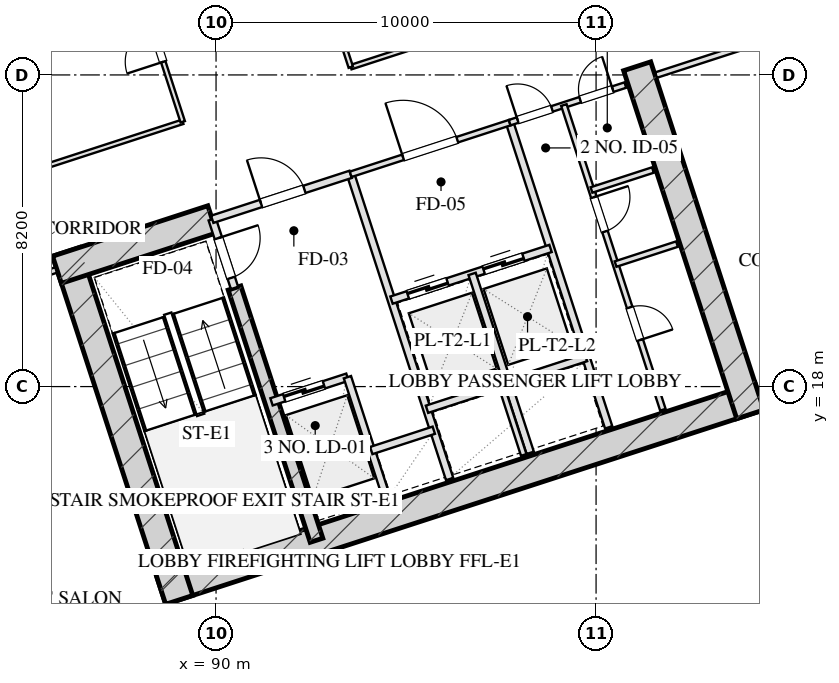
"""IFC4 building model, lengths in metres.
Left out: names, types, materials, properties, quantities, classifications, styles, units other than length and angle.
Written with IfcOpenShell. Run it as: python <this file> out.ifc"""

import sys

from ifc_helpers import new_model, si_unit, direction, frame, frame_2d, origin, place, context, subcontext, project, spatial, rectangle, extrude, element, fill, save


model = new_model("IFC4")
c1 = context("Model", 3, precision=1e-05, world=origin(), true_north=direction((0.0, 1.0)))
c2 = subcontext(c1, "Body", "Model", "MODEL_VIEW")
j1 = project(units=[si_unit("LENGTHUNIT", "METRE"), si_unit("PLANEANGLEUNIT", "RADIAN")], contexts=[c1])
p1 = place(None, origin())
s1 = spatial("IfcSite", under=j1, at=p1, CompositionType="ELEMENT")
p2 = place(p1, origin())
s2 = spatial("IfcBuilding", under=s1, at=p2, CompositionType="ELEMENT")
p3 = place(p2, frame((0.0, 0.0, 57.5)))
s3 = spatial("IfcBuildingStorey", under=s2, at=p3, CompositionType="ELEMENT", Elevation=57.5)
p4 = place(p3, frame((88.559, 12.629, 0.0), z_axis=(0.0, 0.0, 1.0), x_axis=(0.951056072937, 0.309018358888, 0.0)))
e1 = element("IfcWall", 1, at=p4, inside=s3, PredefinedType="SHEAR", context=c2, shape_type="SweptSolid", body=[
    extrude(rectangle(XDim=16.55, YDim=0.75, at=frame_2d((8.275, 0.0))), origin(), (0.0, 0.0, 1.0), 3.45),
])
p5 = place(p3, frame((86.055, 21.546, 0.0), z_axis=(0.0, 0.0, 1.0), x_axis=(0.309023585745, -0.951054374604, 0.0)))
e2 = element("IfcWall", 2, at=p5, inside=s3, PredefinedType="SHEAR", context=c2, shape_type="SweptSolid", body=[
    extrude(rectangle(XDim=9.63, YDim=0.75, at=frame_2d((4.815, 0.0))), origin(), (0.0, 0.0, 1.0), 3.45),
])
p6 = place(p3, frame((101.082, 26.429, 0.0), z_axis=(0.0, 0.0, 1.0), x_axis=(0.309016134813, -0.951056795583, 0.0)))
e3 = element("IfcWall", 3, at=p6, inside=s3, PredefinedType="SHEAR", context=c2, shape_type="SweptSolid", body=[
    extrude(rectangle(XDim=9.63, YDim=0.75, at=frame_2d((4.815, 0.0))), origin(), (0.0, 0.0, 1.0), 3.45),
])
p7 = place(p3, frame((90.486, 20.594, 0.0), z_axis=(0.0, 0.0, 1.0), x_axis=(0.309020428229, -0.951055400562, 0.0)))
e4 = element("IfcWall", 4, at=p7, inside=s3, PredefinedType="SHEAR", context=c2, shape_type="SweptSolid", body=[
    extrude(rectangle(XDim=6.98, YDim=0.35, at=frame_2d((3.49, 0.0))), origin(), (0.0, 0.0, 1.0), 3.45),
])
p8 = place(p3, frame((85.814, 21.074, 0.0), z_axis=(0.0, 0.0, 1.0), x_axis=(0.95106580992, 0.308988390074, 0.0)))
e5 = element("IfcWall", 5, at=p8, inside=s3, PredefinedType="SHEAR", context=c2, shape_type="SweptSolid", body=[
    extrude(rectangle(XDim=4.295, YDim=0.75, at=frame_2d((2.147, 0.0))), origin(), (0.0, 0.0, 1.0), 3.45),
])
p9 = place(p3, frame((100.345, 63.648, 0.0), z_axis=(0.0, 0.0, 1.0), x_axis=(0.309014526607, -0.951057318118, 0.0)))
e6 = element("IfcWall", 6, at=p9, inside=s3, PredefinedType="SOLIDWALL", context=c2, shape_type="SweptSolid", body=[
    extrude(rectangle(XDim=50.0, YDim=0.4, at=frame_2d((25.0, 0.0))), origin(), (0.0, 0.0, 1.0), 2.61),
])
p10 = place(p9, frame((21.85, 0.0, 0.0)))
e7 = element("IfcOpeningElement", 7, at=p10, cuts=e6, PredefinedType="OPENING", context=c2, shape_type="SweptSolid", body=[
    extrude(rectangle(XDim=1.1, YDim=2.15, at=frame_2d((0.55, 1.075))), frame((0.0, 0.21, 0.0), z_axis=(0.0, -1.0, 0.0), x_axis=(1.0, 0.0, 0.0)), (0.0, 0.0, 1.0), 0.42),
])
p11 = place(p3, frame((113.998, 12.567, 0.0), z_axis=(0.0, 0.0, 1.0), x_axis=(-0.951055939317, -0.309018770125, 0.0)))
e8 = element("IfcWall", 8, at=p11, inside=s3, PredefinedType="SOLIDWALL", context=c2, shape_type="SweptSolid", body=[
    extrude(rectangle(XDim=32.4, YDim=0.4, at=frame_2d((16.2, 0.0))), origin(), (0.0, 0.0, 1.0), 2.61),
])
p12 = place(p3, frame((89.899, 22.401, 0.0), z_axis=(0.0, 0.0, 1.0), x_axis=(0.308932062672, -0.951084108086, 0.0)))
e9 = element("IfcWall", 9, at=p12, inside=s3, PredefinedType="PARTITIONING", context=c2, shape_type="SweptSolid", body=[
    extrude(rectangle(XDim=1.9, YDim=0.2, at=frame_2d((0.95, 0.0))), origin(), (0.0, 0.0, 1.0), 3.175),
])
p13 = place(p12, frame((0.52, 0.0, 0.0)))
e10 = element("IfcOpeningElement", 10, at=p13, cuts=e9, PredefinedType="OPENING", context=c2, shape_type="SweptSolid", body=[
    extrude(rectangle(XDim=1.1, YDim=2.05, at=frame_2d((0.55, 1.025))), frame((0.0, 0.11, 0.0), z_axis=(0.0, -1.0, 0.0), x_axis=(1.0, 0.0, 0.0)), (0.0, 0.0, 1.0), 0.22),
])
p14 = place(p3, frame((93.542, 23.585, 0.0), z_axis=(0.0, 0.0, 1.0), x_axis=(0.309042196757, -0.951048327176, 0.0)))
e11 = element("IfcWall", 11, at=p14, inside=s3, PredefinedType="PARTITIONING", context=c2, shape_type="SweptSolid", body=[
    extrude(rectangle(XDim=8.43, YDim=0.2, at=frame_2d((4.215, 0.0))), origin(), (0.0, 0.0, 1.0), 3.175),
])
p15 = place(p3, frame((89.899, 22.401, 0.0), z_axis=(0.0, 0.0, 1.0), x_axis=(0.951046716504, 0.309047153403, 0.0)))
e12 = element("IfcWall", 12, at=p15, inside=s3, PredefinedType="PARTITIONING", context=c2, shape_type="SweptSolid", body=[
    extrude(rectangle(XDim=3.83, YDim=0.2, at=frame_2d((1.915, 0.0))), origin(), (0.0, 0.0, 1.0), 3.175),
])
p16 = place(p15, frame((1.35, 0.0, 0.0)))
e13 = element("IfcOpeningElement", 13, at=p16, cuts=e12, PredefinedType="OPENING", context=c2, shape_type="SweptSolid", body=[
    extrude(rectangle(XDim=1.2, YDim=2.05, at=frame_2d((0.6, 1.025))), frame((0.0, 0.11, 0.0), z_axis=(0.0, -1.0, 0.0), x_axis=(1.0, 0.0, 0.0)), (0.0, 0.0, 1.0), 0.22),
])
p17 = place(p3, frame((91.46, 17.598, 0.0), z_axis=(0.0, 0.0, 1.0), x_axis=(0.951062257173, 0.308999325213, 0.0)))
e14 = element("IfcWall", 14, at=p17, inside=s3, PredefinedType="PARTITIONING", context=c2, shape_type="SweptSolid", body=[
    extrude(rectangle(XDim=2.1, YDim=0.2, at=frame_2d((1.05, 0.0))), origin(), (0.0, 0.0, 1.0), 3.175),
])
p18 = place(p17, frame((0.35, 0.0, 0.0)))
e15 = element("IfcOpeningElement", 15, at=p18, cuts=e14, PredefinedType="OPENING", context=c2, shape_type="SweptSolid", body=[
    extrude(rectangle(XDim=1.1, YDim=2.05, at=frame_2d((0.55, 1.025))), frame((0.0, 0.11, 0.0), z_axis=(0.0, -1.0, 0.0), x_axis=(1.0, 0.0, 0.0)), (0.0, 0.0, 1.0), 0.22),
])
p19 = place(p3, frame((93.457, 18.247, 0.0), z_axis=(0.0, 0.0, 1.0), x_axis=(0.3089935693, -0.951064127245, 0.0)))
e16 = element("IfcWall", 16, at=p19, inside=s3, PredefinedType="PARTITIONING", context=c2, shape_type="SweptSolid", body=[
    extrude(rectangle(XDim=3.7, YDim=0.2, at=frame_2d((1.85, 0.0))), origin(), (0.0, 0.0, 1.0), 3.175),
])
p20 = place(p3, frame((94.084, 16.317, 0.0), z_axis=(0.0, 0.0, 1.0), x_axis=(0.951041328149, 0.309063734775, 0.0)))
e17 = element("IfcWall", 17, at=p20, inside=s3, PredefinedType="PARTITIONING", context=c2, shape_type="SweptSolid", body=[
    extrude(rectangle(XDim=1.73, YDim=0.2, at=frame_2d((0.865, 0.0))), origin(), (0.0, 0.0, 1.0), 3.175),
])
p21 = place(p3, frame((97.727, 24.944, 0.0), z_axis=(0.0, 0.0, 1.0), x_axis=(0.309016001439, -0.951056838919, 0.0)))
e18 = element("IfcWall", 18, at=p21, inside=s3, PredefinedType="PARTITIONING", context=c2, shape_type="SweptSolid", body=[
    extrude(rectangle(XDim=8.43, YDim=0.2, at=frame_2d((4.215, 0.0))), origin(), (0.0, 0.0, 1.0), 3.175),
])
p22 = place(p3, frame((93.542, 23.585, 0.0), z_axis=(0.0, 0.0, 1.0), x_axis=(0.951063829732, 0.308994485023, 0.0)))
e19 = element("IfcWall", 19, at=p22, inside=s3, PredefinedType="PARTITIONING", context=c2, shape_type="SweptSolid", body=[
    extrude(rectangle(XDim=4.4, YDim=0.15, at=frame_2d((2.2, 0.0))), origin(), (0.0, 0.0, 1.0), 3.175),
])
p23 = place(p22, frame((1.45, 0.0, 0.0)))
e20 = element("IfcOpeningElement", 20, at=p23, cuts=e19, PredefinedType="OPENING", context=c2, shape_type="SweptSolid", body=[
    extrude(rectangle(XDim=1.5, YDim=2.05, at=frame_2d((0.75, 1.025))), frame((0.0, 0.085, 0.0), z_axis=(0.0, -1.0, 0.0), x_axis=(1.0, 0.0, 0.0)), (0.0, 0.0, 1.0), 0.17),
])
p24 = place(p3, frame((94.617, 20.275, 0.0), z_axis=(0.0, 0.0, 1.0), x_axis=(0.951058531764, 0.30901079133, 0.0)))
e21 = element("IfcWall", 21, at=p24, inside=s3, PredefinedType="PARTITIONING", context=c2, shape_type="SweptSolid", body=[
    extrude(rectangle(XDim=4.4, YDim=0.2, at=frame_2d((2.2, 0.0))), origin(), (0.0, 0.0, 1.0), 3.175),
])
p25 = place(p24, frame((0.45, 0.0, 0.0)))
e22 = element("IfcOpeningElement", 22, at=p25, cuts=e21, PredefinedType="OPENING", context=c2, shape_type="SweptSolid", body=[
    extrude(rectangle(XDim=1.1, YDim=2.05, at=frame_2d((0.55, 1.025))), frame((0.0, 0.11, 0.0), z_axis=(0.0, -1.0, 0.0), x_axis=(1.0, 0.0, 0.0)), (0.0, 0.0, 1.0), 0.22),
])
p26 = place(p24, frame((2.55, 0.0, 0.0)))
e23 = element("IfcOpeningElement", 23, at=p26, cuts=e21, PredefinedType="OPENING", context=c2, shape_type="SweptSolid", body=[
    extrude(rectangle(XDim=1.1, YDim=2.05, at=frame_2d((0.55, 1.025))), frame((0.0, 0.11, 0.0), z_axis=(0.0, -1.0, 0.0), x_axis=(1.0, 0.0, 0.0)), (0.0, 0.0, 1.0), 0.22),
])
p27 = place(p3, frame((96.738, 20.964, 0.0), z_axis=(0.0, 0.0, 1.0), x_axis=(0.309042578481, -0.951048203135, 0.0)))
e24 = element("IfcWall", 24, at=p27, inside=s3, PredefinedType="PARTITIONING", context=c2, shape_type="SweptSolid", body=[
    extrude(rectangle(XDim=4.95, YDim=0.2, at=frame_2d((2.475, 0.0))), origin(), (0.0, 0.0, 1.0), 3.175),
])
p28 = place(p3, frame((95.551, 17.403, 0.0), z_axis=(0.0, 0.0, 1.0), x_axis=(0.951058531764, 0.30901079133, 0.0)))
e25 = element("IfcWall", 25, at=p28, inside=s3, PredefinedType="PARTITIONING", context=c2, shape_type="SweptSolid", body=[
    extrude(rectangle(XDim=4.4, YDim=0.2, at=frame_2d((2.2, 0.0))), origin(), (0.0, 0.0, 1.0), 3.175),
])
p29 = place(p3, frame((97.516, 17.989, 0.0), z_axis=(0.0, 0.0, 1.0), x_axis=(0.30897153969, -0.951071284217, 0.0)))
e26 = element("IfcWall", 26, at=p29, inside=s3, PredefinedType="PARTITIONING", context=c2, shape_type="SweptSolid", body=[
    extrude(rectangle(XDim=1.88, YDim=0.15, at=frame_2d((0.94, 0.0))), origin(), (0.0, 0.0, 1.0), 3.175),
])
p30 = place(p3, frame((97.727, 24.944, 0.0), z_axis=(0.0, 0.0, 1.0), x_axis=(0.951036872128, 0.309077446369, 0.0)))
e27 = element("IfcWall", 27, at=p30, inside=s3, PredefinedType="PARTITIONING", context=c2, shape_type="SweptSolid", body=[
    extrude(rectangle(XDim=3.2, YDim=0.15, at=frame_2d((1.6, 0.0))), origin(), (0.0, 0.0, 1.0), 3.175),
])
p31 = place(p30, frame((0.22, 0.0, 0.0)))
e28 = element("IfcOpeningElement", 28, at=p31, cuts=e27, PredefinedType="OPENING", context=c2, shape_type="SweptSolid", body=[
    extrude(rectangle(XDim=0.95, YDim=2.05, at=frame_2d((0.475, 1.025))), frame((0.0, 0.085, 0.0), z_axis=(0.0, -1.0, 0.0), x_axis=(1.0, 0.0, 0.0)), (0.0, 0.0, 1.0), 0.17),
])
p32 = place(p30, frame((1.95, 0.0, 0.0)))
e29 = element("IfcOpeningElement", 29, at=p32, cuts=e27, PredefinedType="OPENING", context=c2, shape_type="SweptSolid", body=[
    extrude(rectangle(XDim=0.9, YDim=2.05, at=frame_2d((0.45, 1.025))), frame((0.0, 0.085, 0.0), z_axis=(0.0, -1.0, 0.0), x_axis=(1.0, 0.0, 0.0)), (0.0, 0.0, 1.0), 0.17),
])
p33 = place(p3, frame((99.153, 25.408, 0.0), z_axis=(0.0, 0.0, 1.0), x_axis=(0.309016001439, -0.951056838919, 0.0)))
e30 = element("IfcWall", 30, at=p33, inside=s3, PredefinedType="PARTITIONING", context=c2, shape_type="SweptSolid", body=[
    extrude(rectangle(XDim=8.43, YDim=0.15, at=frame_2d((4.215, 0.0))), origin(), (0.0, 0.0, 1.0), 3.175),
])
p34 = place(p33, frame((2.55, 0.0, 0.0)))
e31 = element("IfcOpeningElement", 31, at=p34, cuts=e30, PredefinedType="OPENING", context=c2, shape_type="SweptSolid", body=[
    extrude(rectangle(XDim=0.95, YDim=2.05, at=frame_2d((0.475, 1.025))), frame((0.0, 0.085, 0.0), z_axis=(0.0, -1.0, 0.0), x_axis=(1.0, 0.0, 0.0)), (0.0, 0.0, 1.0), 0.17),
])
p35 = place(p33, frame((5.6, 0.0, 0.0)))
e32 = element("IfcOpeningElement", 32, at=p35, cuts=e30, PredefinedType="OPENING", context=c2, shape_type="SweptSolid", body=[
    extrude(rectangle(XDim=0.9, YDim=2.05, at=frame_2d((0.45, 1.025))), frame((0.0, 0.085, 0.0), z_axis=(0.0, -1.0, 0.0), x_axis=(1.0, 0.0, 0.0)), (0.0, 0.0, 1.0), 0.17),
])
for number, where, z_axis, x_axis in (
    (33, (100.513, 21.223, 0.0), (0.0, 0.0, 1.0), (0.951, 0.309, 0.0)),
    (34, (99.879, 23.173, 0.0), (0.0, 0.0, 1.0), (0.951, 0.309, 0.0)),
):
    element("IfcWall", number, at=place(p3, frame(where, z_axis=z_axis, x_axis=x_axis)), inside=s3, PredefinedType="PARTITIONING", context=c2, shape_type="SweptSolid", body=[
        extrude(rectangle(XDim=1.7, YDim=0.15, at=frame_2d((0.85, 0.0))), origin(), (0.0, 0.0, 1.0), 3.175),
    ])
p36 = place(p3, frame((75.519, 17.729, 0.0), z_axis=(0.0, 0.0, 1.0), x_axis=(0.951056658866, 0.309016555588, 0.0)))
e35 = element("IfcWall", 35, at=p36, inside=s3, PredefinedType="PARTITIONING", context=c2, shape_type="SweptSolid", body=[
    extrude(rectangle(XDim=10.8, YDim=0.15, at=frame_2d((5.4, 0.0))), origin(), (0.0, 0.0, 1.0), 3.175),
])
p37 = place(p36, frame((4.536, 0.0, 0.0)))
e36 = element("IfcOpeningElement", 36, at=p37, cuts=e35, PredefinedType="OPENING", context=c2, shape_type="SweptSolid", body=[
    extrude(rectangle(XDim=1.0, YDim=2.05, at=frame_2d((0.5, 1.025))), frame((0.0, 0.085, 0.0), z_axis=(0.0, -1.0, 0.0), x_axis=(1.0, 0.0, 0.0)), (0.0, 0.0, 1.0), 0.17),
])
p38 = place(p3, frame((101.578, 26.196, 0.0), z_axis=(0.0, 0.0, 1.0), x_axis=(0.951059043131, 0.309009217467, 0.0)))
e37 = element("IfcWall", 37, at=p38, inside=s3, PredefinedType="PARTITIONING", context=c2, shape_type="SweptSolid", body=[
    extrude(rectangle(XDim=10.2, YDim=0.15, at=frame_2d((5.1, 0.0))), origin(), (0.0, 0.0, 1.0), 3.175),
])
p39 = place(p38, frame((4.284, 0.0, 0.0)))
e38 = element("IfcOpeningElement", 38, at=p39, cuts=e37, PredefinedType="OPENING", context=c2, shape_type="SweptSolid", body=[
    extrude(rectangle(XDim=1.0, YDim=2.05, at=frame_2d((0.5, 1.025))), frame((0.0, 0.085, 0.0), z_axis=(0.0, -1.0, 0.0), x_axis=(1.0, 0.0, 0.0)), (0.0, 0.0, 1.0), 0.17),
])
p40 = place(p3, frame((74.691, 20.278, 0.0), z_axis=(0.0, 0.0, 1.0), x_axis=(0.951054756643, 0.309022409974, 0.0)))
e39 = element("IfcWall", 39, at=p40, inside=s3, PredefinedType="PARTITIONING", context=c2, shape_type="SweptSolid", body=[
    extrude(rectangle(XDim=15.175, YDim=0.12, at=frame_2d((7.587, 0.0))), origin(), (0.0, 0.0, 1.0), 3.175),
])
p41 = place(p3, frame((93.546, 26.404, 0.0), z_axis=(0.0, 0.0, 1.0), x_axis=(0.951058189574, 0.309011844505, 0.0)))
e40 = element("IfcWall", 40, at=p41, inside=s3, PredefinedType="PARTITIONING", context=c2, shape_type="SweptSolid", body=[
    extrude(rectangle(XDim=17.775, YDim=0.12, at=frame_2d((8.887, 0.0))), origin(), (0.0, 0.0, 1.0), 3.175),
])
p42 = place(p3, frame((89.124, 24.967, 0.0), z_axis=(0.0, 0.0, 1.0), x_axis=(-0.30901773025, 0.951056277195, 0.0)))
e41 = element("IfcWall", 41, at=p42, inside=s3, PredefinedType="PARTITIONING", context=c2, shape_type="SweptSolid", body=[
    extrude(rectangle(XDim=16.64, YDim=0.12, at=frame_2d((8.32, 0.0))), origin(), (0.0, 0.0, 1.0), 3.175),
])
p43 = place(p42, frame((1.66, 0.0, 0.0)))
e42 = element("IfcOpeningElement", 42, at=p43, cuts=e41, PredefinedType="OPENING", context=c2, shape_type="SweptSolid", body=[
    extrude(rectangle(XDim=1.0, YDim=2.05, at=frame_2d((0.5, 1.025))), frame((0.0, 0.07, 0.0), z_axis=(0.0, -1.0, 0.0), x_axis=(1.0, 0.0, 0.0)), (0.0, 0.0, 1.0), 0.14),
])
p44 = place(p42, frame((7.82, 0.0, 0.0)))
e43 = element("IfcOpeningElement", 43, at=p44, cuts=e41, PredefinedType="OPENING", context=c2, shape_type="SweptSolid", body=[
    extrude(rectangle(XDim=0.85, YDim=2.05, at=frame_2d((0.425, 1.025))), frame((0.0, 0.07, 0.0), z_axis=(0.0, -1.0, 0.0), x_axis=(1.0, 0.0, 0.0)), (0.0, 0.0, 1.0), 0.14),
])
p45 = place(p42, frame((13.98, 0.0, 0.0)))
e44 = element("IfcOpeningElement", 44, at=p45, cuts=e41, PredefinedType="OPENING", context=c2, shape_type="SweptSolid", body=[
    extrude(rectangle(XDim=1.0, YDim=2.05, at=frame_2d((0.5, 1.025))), frame((0.0, 0.07, 0.0), z_axis=(0.0, -1.0, 0.0), x_axis=(1.0, 0.0, 0.0)), (0.0, 0.0, 1.0), 0.14),
])
p46 = place(p3, frame((93.546, 26.404, 0.0), z_axis=(0.0, 0.0, 1.0), x_axis=(-0.309022042254, 0.951054876125, 0.0)))
e45 = element("IfcWall", 45, at=p46, inside=s3, PredefinedType="PARTITIONING", context=c2, shape_type="SweptSolid", body=[
    extrude(rectangle(XDim=16.64, YDim=0.12, at=frame_2d((8.32, 0.0))), origin(), (0.0, 0.0, 1.0), 3.175),
])
p47 = place(p46, frame((1.16, 0.0, 0.0)))
e46 = element("IfcOpeningElement", 46, at=p47, cuts=e45, PredefinedType="OPENING", context=c2, shape_type="SweptSolid", body=[
    extrude(rectangle(XDim=1.0, YDim=2.05, at=frame_2d((0.5, 1.025))), frame((0.0, 0.07, 0.0), z_axis=(0.0, -1.0, 0.0), x_axis=(1.0, 0.0, 0.0)), (0.0, 0.0, 1.0), 0.14),
])
p48 = place(p46, frame((4.72, 0.0, 0.0)))
e47 = element("IfcOpeningElement", 47, at=p48, cuts=e45, PredefinedType="OPENING", context=c2, shape_type="SweptSolid", body=[
    extrude(rectangle(XDim=1.0, YDim=2.05, at=frame_2d((0.5, 1.025))), frame((0.0, 0.07, 0.0), z_axis=(0.0, -1.0, 0.0), x_axis=(1.0, 0.0, 0.0)), (0.0, 0.0, 1.0), 0.14),
])
p49 = place(p46, frame((7.549, 0.0, 0.0)))
e48 = element("IfcOpeningElement", 48, at=p49, cuts=e45, PredefinedType="OPENING", context=c2, shape_type="SweptSolid", body=[
    extrude(rectangle(XDim=1.0, YDim=2.05, at=frame_2d((0.5, 1.025))), frame((0.0, 0.07, 0.0), z_axis=(0.0, -1.0, 0.0), x_axis=(1.0, 0.0, 0.0)), (0.0, 0.0, 1.0), 0.14),
])
p50 = place(p46, frame((10.148, 0.0, 0.0)))
e49 = element("IfcOpeningElement", 49, at=p50, cuts=e45, PredefinedType="OPENING", context=c2, shape_type="SweptSolid", body=[
    extrude(rectangle(XDim=1.05, YDim=2.05, at=frame_2d((0.525, 1.025))), frame((0.0, 0.07, 0.0), z_axis=(0.0, -1.0, 0.0), x_axis=(1.0, 0.0, 0.0)), (0.0, 0.0, 1.0), 0.14),
])
p51 = place(p46, frame((14.48, 0.0, 0.0)))
e50 = element("IfcOpeningElement", 50, at=p51, cuts=e45, PredefinedType="OPENING", context=c2, shape_type="SweptSolid", body=[
    extrude(rectangle(XDim=1.0, YDim=2.05, at=frame_2d((0.5, 1.025))), frame((0.0, 0.07, 0.0), z_axis=(0.0, -1.0, 0.0), x_axis=(1.0, 0.0, 0.0)), (0.0, 0.0, 1.0), 0.14),
])
p52 = place(p3, frame((73.356, 24.386, 0.0), z_axis=(0.0, 0.0, 1.0), x_axis=(0.951054756643, 0.309022409974, 0.0)))
e51 = element("IfcWall", 51, at=p52, inside=s3, PredefinedType="PARTITIONING", context=c2, shape_type="SweptSolid", body=[
    extrude(rectangle(XDim=15.175, YDim=0.12, at=frame_2d((7.587, 0.0))), origin(), (0.0, 0.0, 1.0), 3.175),
])
p53 = place(p13, origin())
e52 = element("IfcDoor", 52, at=p53, inside=s3, OperationType="SINGLE_SWING_LEFT", PredefinedType="DOOR", context=c2, shape_type="SweptSolid", body=[
    extrude(rectangle(XDim=1.1, YDim=2.05, at=frame_2d((0.55, 1.025))), frame((0.0, 0.025, 0.0), z_axis=(0.0, -1.0, 0.0), x_axis=(1.0, 0.0, 0.0)), (0.0, 0.0, 1.0), 0.05),
])
fill(e10, e52)
p54 = place(p16, origin())
e53 = element("IfcDoor", 53, at=p54, inside=s3, OperationType="SINGLE_SWING_LEFT", PredefinedType="DOOR", context=c2, shape_type="SweptSolid", body=[
    extrude(rectangle(XDim=1.2, YDim=2.05, at=frame_2d((0.6, 1.025))), frame((0.0, 0.025, 0.0), z_axis=(0.0, -1.0, 0.0), x_axis=(1.0, 0.0, 0.0)), (0.0, 0.0, 1.0), 0.05),
])
fill(e13, e53)
p55 = place(p18, origin())
e54 = element("IfcDoor", 54, at=p55, inside=s3, OperationType="DOUBLE_DOOR_SLIDING", PredefinedType="DOOR", context=c2, shape_type="SweptSolid", body=[
    extrude(rectangle(XDim=1.1, YDim=2.05, at=frame_2d((0.55, 1.025))), frame((0.0, 0.025, 0.0), z_axis=(0.0, -1.0, 0.0), x_axis=(1.0, 0.0, 0.0)), (0.0, 0.0, 1.0), 0.05),
])
fill(e15, e54)
p56 = place(p23, origin())
e55 = element("IfcDoor", 55, at=p56, inside=s3, OperationType="SINGLE_SWING_LEFT", PredefinedType="DOOR", context=c2, shape_type="SweptSolid", body=[
    extrude(rectangle(XDim=1.5, YDim=2.05, at=frame_2d((0.75, 1.025))), frame((0.0, 0.025, 0.0), z_axis=(0.0, -1.0, 0.0), x_axis=(1.0, 0.0, 0.0)), (0.0, 0.0, 1.0), 0.05),
])
fill(e20, e55)
p57 = place(p25, origin())
e56 = element("IfcDoor", 56, at=p57, inside=s3, OperationType="DOUBLE_DOOR_SLIDING", PredefinedType="DOOR", context=c2, shape_type="SweptSolid", body=[
    extrude(rectangle(XDim=1.1, YDim=2.05, at=frame_2d((0.55, 1.025))), frame((0.0, 0.025, 0.0), z_axis=(0.0, -1.0, 0.0), x_axis=(1.0, 0.0, 0.0)), (0.0, 0.0, 1.0), 0.05),
])
fill(e22, e56)
p58 = place(p26, origin())
e57 = element("IfcDoor", 57, at=p58, inside=s3, OperationType="DOUBLE_DOOR_SLIDING", PredefinedType="DOOR", context=c2, shape_type="SweptSolid", body=[
    extrude(rectangle(XDim=1.1, YDim=2.05, at=frame_2d((0.55, 1.025))), frame((0.0, 0.025, 0.0), z_axis=(0.0, -1.0, 0.0), x_axis=(1.0, 0.0, 0.0)), (0.0, 0.0, 1.0), 0.05),
])
fill(e23, e57)
p59 = place(p31, origin())
e58 = element("IfcDoor", 58, at=p59, inside=s3, OperationType="SINGLE_SWING_LEFT", PredefinedType="DOOR", context=c2, shape_type="SweptSolid", body=[
    extrude(rectangle(XDim=0.95, YDim=2.05, at=frame_2d((0.475, 1.025))), frame((0.0, 0.025, 0.0), z_axis=(0.0, -1.0, 0.0), x_axis=(1.0, 0.0, 0.0)), (0.0, 0.0, 1.0), 0.05),
])
fill(e28, e58)
p60 = place(p32, origin())
e59 = element("IfcDoor", 59, at=p60, inside=s3, OperationType="SINGLE_SWING_RIGHT", PredefinedType="DOOR", context=c2, shape_type="SweptSolid", body=[
    extrude(rectangle(XDim=0.9, YDim=2.05, at=frame_2d((0.45, 1.025))), frame((0.0, 0.025, 0.0), z_axis=(0.0, -1.0, 0.0), x_axis=(1.0, 0.0, 0.0)), (0.0, 0.0, 1.0), 0.05),
])
fill(e29, e59)
p61 = place(p34, origin())
e60 = element("IfcDoor", 60, at=p61, inside=s3, OperationType="SINGLE_SWING_LEFT", PredefinedType="DOOR", context=c2, shape_type="SweptSolid", body=[
    extrude(rectangle(XDim=0.95, YDim=2.05, at=frame_2d((0.475, 1.025))), frame((0.0, 0.025, 0.0), z_axis=(0.0, -1.0, 0.0), x_axis=(1.0, 0.0, 0.0)), (0.0, 0.0, 1.0), 0.05),
])
fill(e31, e60)
p62 = place(p35, origin())
e61 = element("IfcDoor", 61, at=p62, inside=s3, OperationType="SINGLE_SWING_RIGHT", PredefinedType="DOOR", context=c2, shape_type="SweptSolid", body=[
    extrude(rectangle(XDim=0.9, YDim=2.05, at=frame_2d((0.45, 1.025))), frame((0.0, 0.025, 0.0), z_axis=(0.0, -1.0, 0.0), x_axis=(1.0, 0.0, 0.0)), (0.0, 0.0, 1.0), 0.05),
])
fill(e32, e61)
p63 = place(p43, origin())
e62 = element("IfcDoor", 62, at=p63, inside=s3, OperationType="SINGLE_SWING_LEFT", PredefinedType="DOOR", context=c2, shape_type="SweptSolid", body=[
    extrude(rectangle(XDim=1.0, YDim=2.05, at=frame_2d((0.5, 1.025))), frame((0.0, 0.025, 0.0), z_axis=(0.0, -1.0, 0.0), x_axis=(1.0, 0.0, 0.0)), (0.0, 0.0, 1.0), 0.05),
])
fill(e42, e62)
save(model, sys.argv[1])
